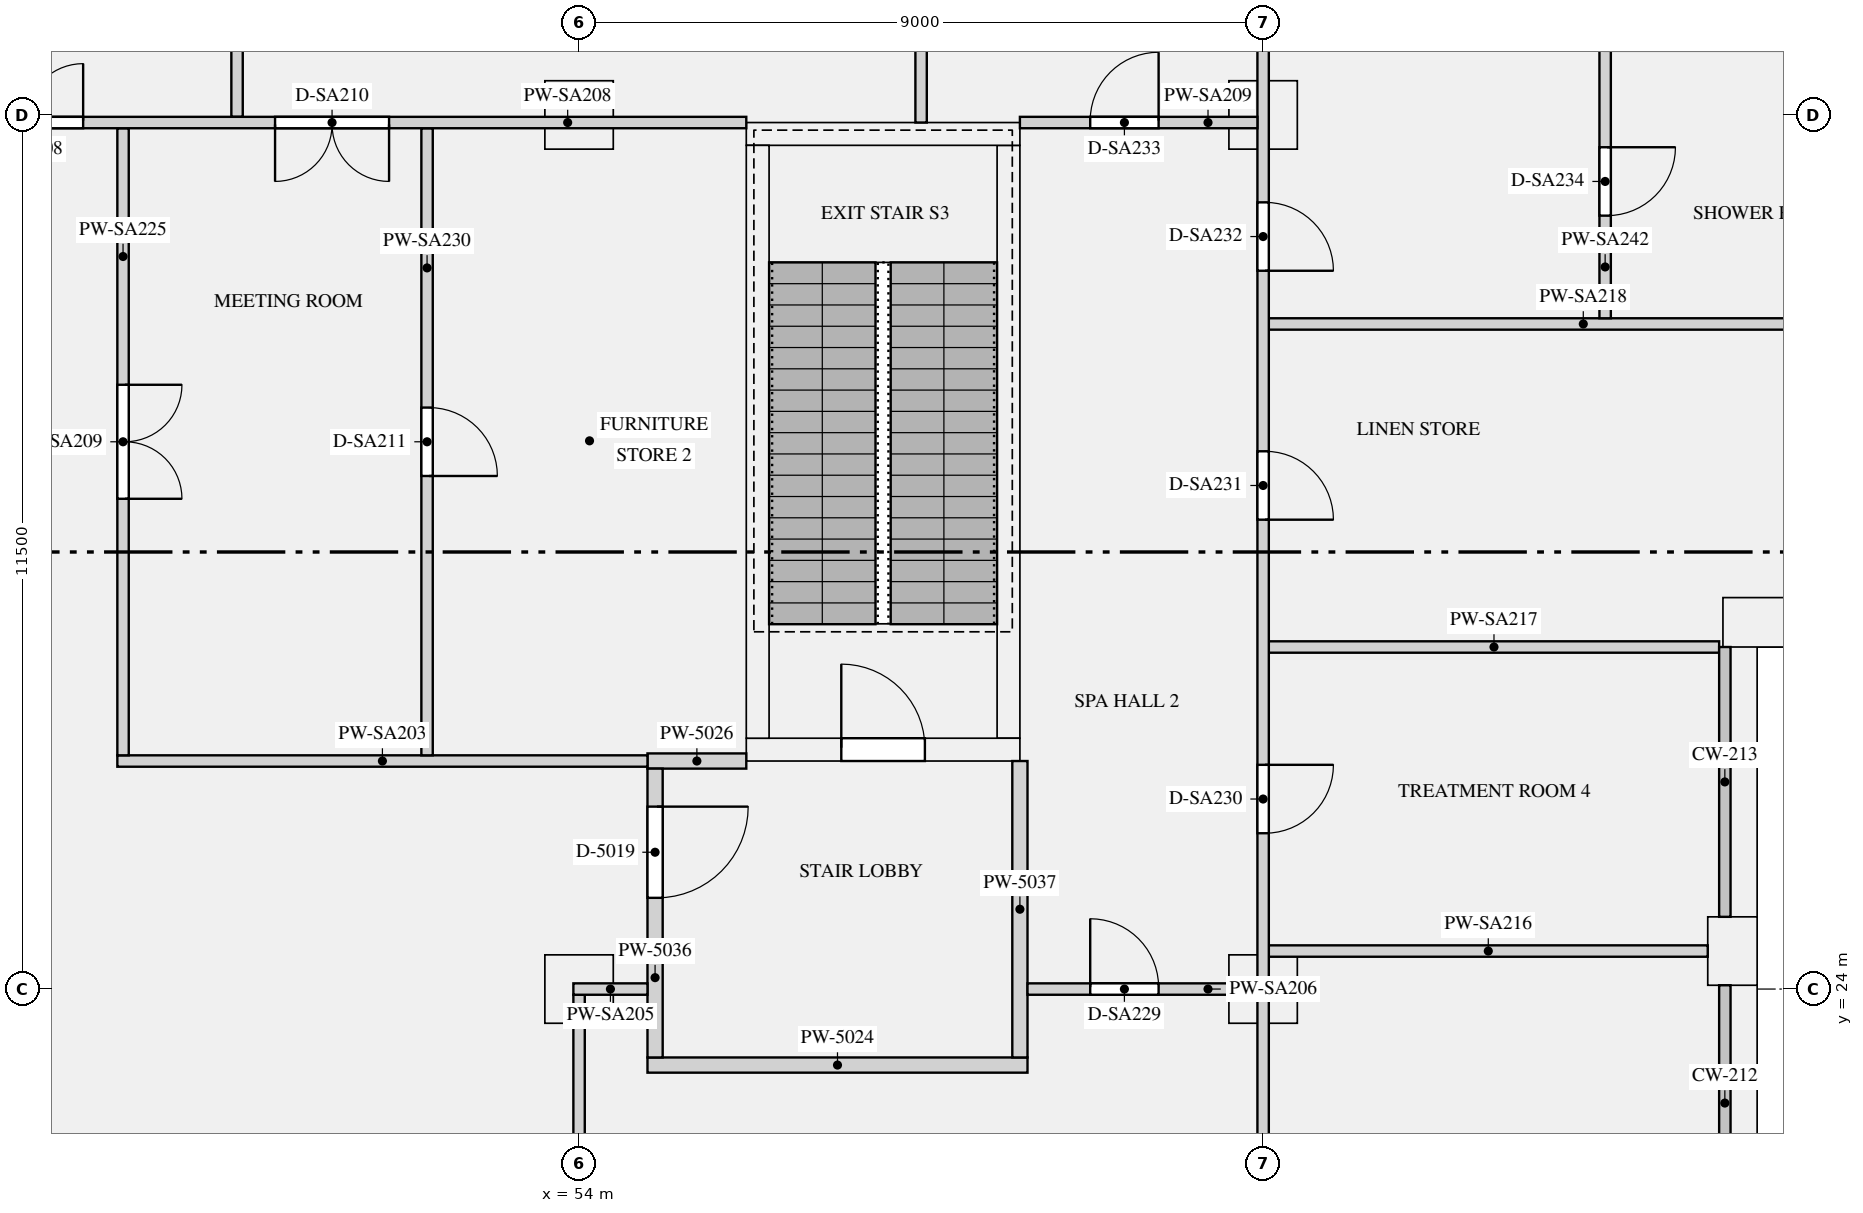
"""IFC4 building model, lengths in metres.
Left out: names, types, materials, properties, quantities, classifications, styles, units other than length and angle.
Written with IfcOpenShell. Run it as: python <this file> out.ifc"""

import sys

from ifc_helpers import new_model, si_unit, direction, frame, frame_2d, origin, origin_2d, place, context, subcontext, project, spatial, rectangle, extrude, element, fill, save


model = new_model("IFC4")
c1 = context("Model", 3, precision=1e-05, world=origin(), true_north=direction((0.0, 1.0)))
c2 = subcontext(c1, "Body", "Model", "MODEL_VIEW")
j1 = project(units=[si_unit("LENGTHUNIT", "METRE"), si_unit("PLANEANGLEUNIT", "RADIAN")], contexts=[c1])
p1 = place(None, origin())
s1 = spatial("IfcSite", under=j1, at=p1, CompositionType="ELEMENT")
p2 = place(p1, origin())
s2 = spatial("IfcBuilding", under=s1, at=p2, CompositionType="ELEMENT")
p3 = place(p2, frame((0.0, 0.0, 191.7)))
s3 = spatial("IfcBuildingStorey", under=s2, at=p3, CompositionType="ELEMENT", Elevation=191.7)
for number, where, z_axis, x_axis in (
    (1, (69.175, 24.5, 0.0), (0.0, 0.0, 1.0), (0.0, 1.0, 0.0)),
    (2, (69.5, 28.825, 0.0), (0.0, 0.0, 1.0), (1.0, 0.0, 0.0)),
):
    element("IfcColumn", number, at=place(p3, frame(where, z_axis=z_axis, x_axis=x_axis)), inside=s3, PredefinedType="USERDEFINED", context=c2, shape_type="SweptSolid", body=[
        extrude(rectangle(XDim=0.9, YDim=0.65, at=origin_2d()), origin(), (0.0, 0.0, 1.0), 6.3),
    ])
for number, where, z_axis, x_axis in (
    (3, (54.0, 24.0, 0.0), (0.0, 0.0, 1.0), (1.0, 0.0, 0.0)),
    (4, (63.0, 24.0, 0.0), (0.0, 0.0, 1.0), (1.0, 0.0, 0.0)),
    (5, (54.0, 35.5, 0.0), (0.0, 0.0, 1.0), (1.0, 0.0, 0.0)),
    (6, (63.0, 35.5, 0.0), (0.0, 0.0, 1.0), (1.0, 0.0, 0.0)),
):
    element("IfcColumn", number, at=place(p3, frame(where, z_axis=z_axis, x_axis=x_axis)), inside=s3, PredefinedType="COLUMN", context=c2, shape_type="SweptSolid", body=[
        extrude(rectangle(XDim=0.9, YDim=0.9, at=origin_2d()), origin(), (0.0, 0.0, 1.0), 6.3),
    ])
p4 = place(p3, frame((56.2, 27.15, 0.0), z_axis=(0.0, 0.0, 1.0), x_axis=(1.0, 0.0, 0.0)))
e7 = element("IfcWall", 7, at=p4, inside=s3, PredefinedType="SHEAR", context=c2, shape_type="SweptSolid", body=[
    extrude(rectangle(XDim=3.6, YDim=0.3, at=frame_2d((1.8, 0.0))), origin(), (0.0, 0.0, 1.0), 6.3),
])
p5 = place(p4, frame((1.25, 0.0, 0.0)))
e8 = element("IfcOpeningElement", 8, at=p5, cuts=e7, PredefinedType="OPENING", context=c2, shape_type="SweptSolid", body=[
    extrude(rectangle(XDim=1.1, YDim=2.1, at=frame_2d((0.55, 1.05))), frame((0.0, 0.16, 0.0), z_axis=(0.0, -1.0, 0.0), x_axis=(1.0, 0.0, 0.0)), (0.0, 0.0, 1.0), 0.32),
])
p6 = place(p3, frame((56.2, 35.25, 0.0), z_axis=(0.0, 0.0, 1.0), x_axis=(1.0, 0.0, 0.0)))
e9 = element("IfcWall", 9, at=p6, inside=s3, PredefinedType="SHEAR", context=c2, shape_type="SweptSolid", body=[
    extrude(rectangle(XDim=3.6, YDim=0.3, at=frame_2d((1.8, 0.0))), origin(), (0.0, 0.0, 1.0), 6.3),
])
for number, where, z_axis, x_axis in (
    (10, (56.35, 27.3, 0.0), (0.0, 0.0, 1.0), (0.0, 1.0, 0.0)),
    (11, (59.65, 27.3, 0.0), (0.0, 0.0, 1.0), (0.0, 1.0, 0.0)),
):
    element("IfcWall", number, at=place(p3, frame(where, z_axis=z_axis, x_axis=x_axis)), inside=s3, PredefinedType="SHEAR", context=c2, shape_type="SweptSolid", body=[
        extrude(rectangle(XDim=7.8, YDim=0.3, at=frame_2d((3.9, 0.0))), origin(), (0.0, 0.0, 1.0), 6.3),
    ])
p7 = place(p3, frame((54.9, 23.0, 0.0), z_axis=(0.0, 0.0, 1.0), x_axis=(1.0, 0.0, 0.0)))
e12 = element("IfcWall", 12, at=p7, inside=s3, PredefinedType="PARTITIONING", context=c2, shape_type="SweptSolid", body=[
    extrude(rectangle(XDim=5.0, YDim=0.2, at=frame_2d((2.5, 0.0))), origin(), (0.0, 0.0, 1.0), 5.98),
])
p8 = place(p3, frame((54.9, 27.0, 0.0), z_axis=(0.0, 0.0, 1.0), x_axis=(1.0, 0.0, 0.0)))
e13 = element("IfcWall", 13, at=p8, inside=s3, PredefinedType="PARTITIONING", context=c2, shape_type="SweptSolid", body=[
    extrude(rectangle(XDim=1.3, YDim=0.2, at=frame_2d((0.65, 0.0))), origin(), (0.0, 0.0, 1.0), 5.98),
])
p9 = place(p3, frame((55.0, 23.1, 0.0), z_axis=(0.0, 0.0, 1.0), x_axis=(0.0, 1.0, 0.0)))
e14 = element("IfcWall", 14, at=p9, inside=s3, PredefinedType="PARTITIONING", context=c2, shape_type="SweptSolid", body=[
    extrude(rectangle(XDim=3.8, YDim=0.2, at=frame_2d((1.9, 0.0))), origin(), (0.0, 0.0, 1.0), 5.98),
])
p10 = place(p9, frame((2.1, 0.0, 0.0)))
e15 = element("IfcOpeningElement", 15, at=p10, cuts=e14, PredefinedType="OPENING", context=c2, shape_type="SweptSolid", body=[
    extrude(rectangle(XDim=1.2, YDim=2.1, at=frame_2d((0.6, 1.05))), frame((0.0, 0.11, 0.0), z_axis=(0.0, -1.0, 0.0), x_axis=(1.0, 0.0, 0.0)), (0.0, 0.0, 1.0), 0.22),
])
p11 = place(p3, frame((59.8, 23.1, 0.0), z_axis=(0.0, 0.0, 1.0), x_axis=(0.0, 1.0, 0.0)))
e16 = element("IfcWall", 16, at=p11, inside=s3, PredefinedType="PARTITIONING", context=c2, shape_type="SweptSolid", body=[
    extrude(rectangle(XDim=3.9, YDim=0.2, at=frame_2d((1.95, 0.0))), origin(), (0.0, 0.0, 1.0), 5.98),
])
p12 = place(p3, frame((47.925, 27.0, 0.0), z_axis=(0.0, 0.0, 1.0), x_axis=(1.0, 0.0, 0.0)))
e17 = element("IfcWall", 17, at=p12, inside=s3, PredefinedType="PARTITIONING", context=c2, shape_type="SweptSolid", body=[
    extrude(rectangle(XDim=6.975, YDim=0.15, at=frame_2d((3.487, 0.0))), origin(), (0.0, 0.0, 1.0), 5.98),
])
p13 = place(p3, frame((53.925, 24.0, 0.0), z_axis=(0.0, 0.0, 1.0), x_axis=(1.0, 0.0, 0.0)))
e18 = element("IfcWall", 18, at=p13, inside=s3, PredefinedType="PARTITIONING", context=c2, shape_type="SweptSolid", body=[
    extrude(rectangle(XDim=0.975, YDim=0.15, at=frame_2d((0.487, 0.0))), origin(), (0.0, 0.0, 1.0), 5.98),
])
p14 = place(p3, frame((59.9, 24.0, 0.0), z_axis=(0.0, 0.0, 1.0), x_axis=(1.0, 0.0, 0.0)))
e19 = element("IfcWall", 19, at=p14, inside=s3, PredefinedType="PARTITIONING", context=c2, shape_type="SweptSolid", body=[
    extrude(rectangle(XDim=3.025, YDim=0.15, at=frame_2d((1.513, 0.0))), origin(), (0.0, 0.0, 1.0), 5.98),
])
p15 = place(p14, frame((0.825, 0.0, 0.0)))
e20 = element("IfcOpeningElement", 20, at=p15, cuts=e19, PredefinedType="OPENING", context=c2, shape_type="SweptSolid", body=[
    extrude(rectangle(XDim=0.9, YDim=2.1, at=frame_2d((0.45, 1.05))), frame((0.0, 0.085, 0.0), z_axis=(0.0, -1.0, 0.0), x_axis=(1.0, 0.0, 0.0)), (0.0, 0.0, 1.0), 0.17),
])
p16 = place(p3, frame((45.0, 35.4, 0.0), z_axis=(0.0, 0.0, 1.0), x_axis=(1.0, 0.0, 0.0)))
e21 = element("IfcWall", 21, at=p16, inside=s3, PredefinedType="PARTITIONING", context=c2, shape_type="SweptSolid", body=[
    extrude(rectangle(XDim=11.2, YDim=0.15, at=frame_2d((5.6, 0.0))), origin(), (0.0, 0.0, 1.0), 5.98),
])
p17 = place(p16, frame((0.975, 0.0, 0.0)))
e22 = element("IfcOpeningElement", 22, at=p17, cuts=e21, PredefinedType="OPENING", context=c2, shape_type="SweptSolid", body=[
    extrude(rectangle(XDim=1.5, YDim=2.1, at=frame_2d((0.75, 1.05))), frame((0.0, 0.085, 0.0), z_axis=(0.0, -1.0, 0.0), x_axis=(1.0, 0.0, 0.0)), (0.0, 0.0, 1.0), 0.17),
])
p18 = place(p16, frame((5.0, 0.0, 0.0)))
e23 = element("IfcOpeningElement", 23, at=p18, cuts=e21, PredefinedType="OPENING", context=c2, shape_type="SweptSolid", body=[
    extrude(rectangle(XDim=1.5, YDim=2.1, at=frame_2d((0.75, 1.05))), frame((0.0, 0.085, 0.0), z_axis=(0.0, -1.0, 0.0), x_axis=(1.0, 0.0, 0.0)), (0.0, 0.0, 1.0), 0.17),
])
p19 = place(p3, frame((59.8, 35.4, 0.0), z_axis=(0.0, 0.0, 1.0), x_axis=(1.0, 0.0, 0.0)))
e24 = element("IfcWall", 24, at=p19, inside=s3, PredefinedType="PARTITIONING", context=c2, shape_type="SweptSolid", body=[
    extrude(rectangle(XDim=3.125, YDim=0.15, at=frame_2d((1.562, 0.0))), origin(), (0.0, 0.0, 1.0), 5.98),
])
p20 = place(p19, frame((0.925, 0.0, 0.0)))
e25 = element("IfcOpeningElement", 25, at=p20, cuts=e24, PredefinedType="OPENING", context=c2, shape_type="SweptSolid", body=[
    extrude(rectangle(XDim=0.9, YDim=2.1, at=frame_2d((0.45, 1.05))), frame((0.0, 0.085, 0.0), z_axis=(0.0, -1.0, 0.0), x_axis=(1.0, 0.0, 0.0)), (0.0, 0.0, 1.0), 0.17),
])
p21 = place(p3, frame((63.075, 24.5, 0.0), z_axis=(0.0, 0.0, 1.0), x_axis=(1.0, 0.0, 0.0)))
e26 = element("IfcWall", 26, at=p21, inside=s3, PredefinedType="PARTITIONING", context=c2, shape_type="SweptSolid", body=[
    extrude(rectangle(XDim=5.775, YDim=0.15, at=frame_2d((2.888, 0.0))), origin(), (0.0, 0.0, 1.0), 5.98),
])
p22 = place(p3, frame((63.075, 28.5, 0.0), z_axis=(0.0, 0.0, 1.0), x_axis=(1.0, 0.0, 0.0)))
e27 = element("IfcWall", 27, at=p22, inside=s3, PredefinedType="PARTITIONING", context=c2, shape_type="SweptSolid", body=[
    extrude(rectangle(XDim=5.925, YDim=0.15, at=frame_2d((2.962, 0.0))), origin(), (0.0, 0.0, 1.0), 5.98),
])
p23 = place(p3, frame((63.075, 32.75, 0.0), z_axis=(0.0, 0.0, 1.0), x_axis=(1.0, 0.0, 0.0)))
e28 = element("IfcWall", 28, at=p23, inside=s3, PredefinedType="PARTITIONING", context=c2, shape_type="SweptSolid", body=[
    extrude(rectangle(XDim=8.275, YDim=0.15, at=frame_2d((4.138, 0.0))), origin(), (0.0, 0.0, 1.0), 5.98),
])
p24 = place(p3, frame((54.0, 16.1, 0.0), z_axis=(0.0, 0.0, 1.0), x_axis=(0.0, 1.0, 0.0)))
e29 = element("IfcWall", 29, at=p24, inside=s3, PredefinedType="PARTITIONING", context=c2, shape_type="SweptSolid", body=[
    extrude(rectangle(XDim=7.825, YDim=0.15, at=frame_2d((3.913, 0.0))), origin(), (0.0, 0.0, 1.0), 5.98),
])
p25 = place(p24, frame((1.65, 0.0, 0.0)))
e30 = element("IfcOpeningElement", 30, at=p25, cuts=e29, PredefinedType="OPENING", context=c2, shape_type="SweptSolid", body=[
    extrude(rectangle(XDim=1.5, YDim=2.1, at=frame_2d((0.75, 1.05))), frame((0.0, 0.085, 0.0), z_axis=(0.0, -1.0, 0.0), x_axis=(1.0, 0.0, 0.0)), (0.0, 0.0, 1.0), 0.17),
])
p26 = place(p3, frame((48.0, 27.075, 0.0), z_axis=(0.0, 0.0, 1.0), x_axis=(0.0, 1.0, 0.0)))
e31 = element("IfcWall", 31, at=p26, inside=s3, PredefinedType="PARTITIONING", context=c2, shape_type="SweptSolid", body=[
    extrude(rectangle(XDim=8.25, YDim=0.15, at=frame_2d((4.125, 0.0))), origin(), (0.0, 0.0, 1.0), 5.98),
])
p27 = place(p26, frame((3.375, 0.0, 0.0)))
e32 = element("IfcOpeningElement", 32, at=p27, cuts=e31, PredefinedType="OPENING", context=c2, shape_type="SweptSolid", body=[
    extrude(rectangle(XDim=1.5, YDim=2.1, at=frame_2d((0.75, 1.05))), frame((0.0, 0.085, 0.0), z_axis=(0.0, -1.0, 0.0), x_axis=(1.0, 0.0, 0.0)), (0.0, 0.0, 1.0), 0.17),
])
p28 = place(p3, frame((49.5, 35.475, 0.0), z_axis=(0.0, 0.0, 1.0), x_axis=(0.0, 1.0, 0.0)))
e33 = element("IfcWall", 33, at=p28, inside=s3, PredefinedType="PARTITIONING", context=c2, shape_type="SweptSolid", body=[
    extrude(rectangle(XDim=5.375, YDim=0.15, at=frame_2d((2.688, 0.0))), origin(), (0.0, 0.0, 1.0), 5.98),
])
p29 = place(p3, frame((52.0, 27.075, 0.0), z_axis=(0.0, 0.0, 1.0), x_axis=(0.0, 1.0, 0.0)))
e34 = element("IfcWall", 34, at=p29, inside=s3, PredefinedType="PARTITIONING", context=c2, shape_type="SweptSolid", body=[
    extrude(rectangle(XDim=8.25, YDim=0.15, at=frame_2d((4.125, 0.0))), origin(), (0.0, 0.0, 1.0), 5.98),
])
p30 = place(p29, frame((3.675, 0.0, 0.0)))
e35 = element("IfcOpeningElement", 35, at=p30, cuts=e34, PredefinedType="OPENING", context=c2, shape_type="SweptSolid", body=[
    extrude(rectangle(XDim=0.9, YDim=2.1, at=frame_2d((0.45, 1.05))), frame((0.0, 0.085, 0.0), z_axis=(0.0, -1.0, 0.0), x_axis=(1.0, 0.0, 0.0)), (0.0, 0.0, 1.0), 0.17),
])
p31 = place(p3, frame((58.5, 35.4, 0.0), z_axis=(0.0, 0.0, 1.0), x_axis=(0.0, 1.0, 0.0)))
e36 = element("IfcWall", 36, at=p31, inside=s3, PredefinedType="PARTITIONING", context=c2, shape_type="SweptSolid", body=[
    extrude(rectangle(XDim=5.45, YDim=0.15, at=frame_2d((2.725, 0.0))), origin(), (0.0, 0.0, 1.0), 5.98),
])
p32 = place(p3, frame((63.0, 16.575, 0.0), z_axis=(0.0, 0.0, 1.0), x_axis=(0.0, 1.0, 0.0)))
e37 = element("IfcWall", 37, at=p32, inside=s3, PredefinedType="PARTITIONING", context=c2, shape_type="SweptSolid", body=[
    extrude(rectangle(XDim=24.275, YDim=0.15, at=frame_2d((12.138, 0.0))), origin(), (0.0, 0.0, 1.0), 5.98),
])
p33 = place(p32, frame((2.7, 0.0, 0.0)))
e38 = element("IfcOpeningElement", 38, at=p33, cuts=e37, PredefinedType="OPENING", context=c2, shape_type="SweptSolid", body=[
    extrude(rectangle(XDim=1.5, YDim=2.1, at=frame_2d((0.75, 1.05))), frame((0.0, 0.085, 0.0), z_axis=(0.0, -1.0, 0.0), x_axis=(1.0, 0.0, 0.0)), (0.0, 0.0, 1.0), 0.17),
])
p34 = place(p32, frame((9.475, 0.0, 0.0)))
e39 = element("IfcOpeningElement", 39, at=p34, cuts=e37, PredefinedType="OPENING", context=c2, shape_type="SweptSolid", body=[
    extrude(rectangle(XDim=0.9, YDim=2.1, at=frame_2d((0.45, 1.05))), frame((0.0, 0.085, 0.0), z_axis=(0.0, -1.0, 0.0), x_axis=(1.0, 0.0, 0.0)), (0.0, 0.0, 1.0), 0.17),
])
p35 = place(p32, frame((13.6, 0.0, 0.0)))
e40 = element("IfcOpeningElement", 40, at=p35, cuts=e37, PredefinedType="OPENING", context=c2, shape_type="SweptSolid", body=[
    extrude(rectangle(XDim=0.9, YDim=2.1, at=frame_2d((0.45, 1.05))), frame((0.0, 0.085, 0.0), z_axis=(0.0, -1.0, 0.0), x_axis=(1.0, 0.0, 0.0)), (0.0, 0.0, 1.0), 0.17),
])
p36 = place(p32, frame((16.875, 0.0, 0.0)))
e41 = element("IfcOpeningElement", 41, at=p36, cuts=e37, PredefinedType="OPENING", context=c2, shape_type="SweptSolid", body=[
    extrude(rectangle(XDim=0.9, YDim=2.1, at=frame_2d((0.45, 1.05))), frame((0.0, 0.085, 0.0), z_axis=(0.0, -1.0, 0.0), x_axis=(1.0, 0.0, 0.0)), (0.0, 0.0, 1.0), 0.17),
])
p37 = place(p3, frame((67.5, 32.825, 0.0), z_axis=(0.0, 0.0, 1.0), x_axis=(0.0, 1.0, 0.0)))
e42 = element("IfcWall", 42, at=p37, inside=s3, PredefinedType="PARTITIONING", context=c2, shape_type="SweptSolid", body=[
    extrude(rectangle(XDim=3.525, YDim=0.15, at=frame_2d((1.763, 0.0))), origin(), (0.0, 0.0, 1.0), 5.98),
])
p38 = place(p37, frame((1.35, 0.0, 0.0)))
e43 = element("IfcOpeningElement", 43, at=p38, cuts=e42, PredefinedType="OPENING", context=c2, shape_type="SweptSolid", body=[
    extrude(rectangle(XDim=0.9, YDim=2.1, at=frame_2d((0.45, 1.05))), frame((0.0, 0.085, 0.0), z_axis=(0.0, -1.0, 0.0), x_axis=(1.0, 0.0, 0.0)), (0.0, 0.0, 1.0), 0.17),
])
p39 = place(p5, origin())
e44 = element("IfcDoor", 44, at=p39, inside=s3, OperationType="SINGLE_SWING_LEFT", PredefinedType="DOOR", context=c2, shape_type="SweptSolid", body=[
    extrude(rectangle(XDim=1.1, YDim=2.1, at=frame_2d((0.55, 1.05))), frame((0.0, 0.025, 0.0), z_axis=(0.0, -1.0, 0.0), x_axis=(1.0, 0.0, 0.0)), (0.0, 0.0, 1.0), 0.05),
])
fill(e8, e44)
p40 = place(p10, frame((1.2, 0.0, 0.0), z_axis=(0.0, 0.0, 1.0), x_axis=(-1.0, 0.0, 0.0)))
e45 = element("IfcDoor", 45, at=p40, inside=s3, OperationType="SINGLE_SWING_LEFT", PredefinedType="DOOR", context=c2, shape_type="SweptSolid", body=[
    extrude(rectangle(XDim=1.2, YDim=2.1, at=frame_2d((0.6, 1.05))), frame((0.0, 0.025, 0.0), z_axis=(0.0, -1.0, 0.0), x_axis=(1.0, 0.0, 0.0)), (0.0, 0.0, 1.0), 0.05),
])
fill(e15, e45)
p41 = place(p17, origin())
e46 = element("IfcDoor", 46, at=p41, inside=s3, OperationType="DOUBLE_DOOR_SINGLE_SWING", PredefinedType="DOOR", context=c2, shape_type="SweptSolid", body=[
    extrude(rectangle(XDim=1.5, YDim=2.1, at=frame_2d((0.75, 1.05))), frame((0.0, 0.025, 0.0), z_axis=(0.0, -1.0, 0.0), x_axis=(1.0, 0.0, 0.0)), (0.0, 0.0, 1.0), 0.05),
])
fill(e22, e46)
p42 = place(p27, frame((1.5, 0.0, 0.0), z_axis=(0.0, 0.0, 1.0), x_axis=(-1.0, 0.0, 0.0)))
e47 = element("IfcDoor", 47, at=p42, inside=s3, OperationType="DOUBLE_DOOR_SINGLE_SWING", PredefinedType="DOOR", context=c2, shape_type="SweptSolid", body=[
    extrude(rectangle(XDim=1.5, YDim=2.1, at=frame_2d((0.75, 1.05))), frame((0.0, 0.025, 0.0), z_axis=(0.0, -1.0, 0.0), x_axis=(1.0, 0.0, 0.0)), (0.0, 0.0, 1.0), 0.05),
])
fill(e32, e47)
p43 = place(p18, frame((1.5, 0.0, 0.0), z_axis=(0.0, 0.0, 1.0), x_axis=(-1.0, 0.0, 0.0)))
e48 = element("IfcDoor", 48, at=p43, inside=s3, OperationType="DOUBLE_DOOR_SINGLE_SWING", PredefinedType="DOOR", context=c2, shape_type="SweptSolid", body=[
    extrude(rectangle(XDim=1.5, YDim=2.1, at=frame_2d((0.75, 1.05))), frame((0.0, 0.025, 0.0), z_axis=(0.0, -1.0, 0.0), x_axis=(1.0, 0.0, 0.0)), (0.0, 0.0, 1.0), 0.05),
])
fill(e23, e48)
p44 = place(p30, frame((0.9, 0.0, 0.0), z_axis=(0.0, 0.0, 1.0), x_axis=(-1.0, 0.0, 0.0)))
e49 = element("IfcDoor", 49, at=p44, inside=s3, OperationType="SINGLE_SWING_RIGHT", PredefinedType="DOOR", context=c2, shape_type="SweptSolid", body=[
    extrude(rectangle(XDim=0.9, YDim=2.1, at=frame_2d((0.45, 1.05))), frame((0.0, 0.025, 0.0), z_axis=(0.0, -1.0, 0.0), x_axis=(1.0, 0.0, 0.0)), (0.0, 0.0, 1.0), 0.05),
])
fill(e35, e49)
p45 = place(p15, origin())
e50 = element("IfcDoor", 50, at=p45, inside=s3, OperationType="SINGLE_SWING_LEFT", PredefinedType="DOOR", context=c2, shape_type="SweptSolid", body=[
    extrude(rectangle(XDim=0.9, YDim=2.1, at=frame_2d((0.45, 1.05))), frame((0.0, 0.025, 0.0), z_axis=(0.0, -1.0, 0.0), x_axis=(1.0, 0.0, 0.0)), (0.0, 0.0, 1.0), 0.05),
])
fill(e20, e50)
p46 = place(p34, frame((0.9, 0.0, 0.0), z_axis=(0.0, 0.0, 1.0), x_axis=(-1.0, 0.0, 0.0)))
e51 = element("IfcDoor", 51, at=p46, inside=s3, OperationType="SINGLE_SWING_LEFT", PredefinedType="DOOR", context=c2, shape_type="SweptSolid", body=[
    extrude(rectangle(XDim=0.9, YDim=2.1, at=frame_2d((0.45, 1.05))), frame((0.0, 0.025, 0.0), z_axis=(0.0, -1.0, 0.0), x_axis=(1.0, 0.0, 0.0)), (0.0, 0.0, 1.0), 0.05),
])
fill(e39, e51)
p47 = place(p35, frame((0.9, 0.0, 0.0), z_axis=(0.0, 0.0, 1.0), x_axis=(-1.0, 0.0, 0.0)))
e52 = element("IfcDoor", 52, at=p47, inside=s3, OperationType="SINGLE_SWING_RIGHT", PredefinedType="DOOR", context=c2, shape_type="SweptSolid", body=[
    extrude(rectangle(XDim=0.9, YDim=2.1, at=frame_2d((0.45, 1.05))), frame((0.0, 0.025, 0.0), z_axis=(0.0, -1.0, 0.0), x_axis=(1.0, 0.0, 0.0)), (0.0, 0.0, 1.0), 0.05),
])
fill(e40, e52)
p48 = place(p36, frame((0.9, 0.0, 0.0), z_axis=(0.0, 0.0, 1.0), x_axis=(-1.0, 0.0, 0.0)))
e53 = element("IfcDoor", 53, at=p48, inside=s3, OperationType="SINGLE_SWING_RIGHT", PredefinedType="DOOR", context=c2, shape_type="SweptSolid", body=[
    extrude(rectangle(XDim=0.9, YDim=2.1, at=frame_2d((0.45, 1.05))), frame((0.0, 0.025, 0.0), z_axis=(0.0, -1.0, 0.0), x_axis=(1.0, 0.0, 0.0)), (0.0, 0.0, 1.0), 0.05),
])
fill(e41, e53)
p49 = place(p20, origin())
e54 = element("IfcDoor", 54, at=p49, inside=s3, OperationType="SINGLE_SWING_RIGHT", PredefinedType="DOOR", context=c2, shape_type="SweptSolid", body=[
    extrude(rectangle(XDim=0.9, YDim=2.1, at=frame_2d((0.45, 1.05))), frame((0.0, 0.025, 0.0), z_axis=(0.0, -1.0, 0.0), x_axis=(1.0, 0.0, 0.0)), (0.0, 0.0, 1.0), 0.05),
])
fill(e25, e54)
p50 = place(p38, frame((0.9, 0.0, 0.0), z_axis=(0.0, 0.0, 1.0), x_axis=(-1.0, 0.0, 0.0)))
e55 = element("IfcDoor", 55, at=p50, inside=s3, OperationType="SINGLE_SWING_LEFT", PredefinedType="DOOR", context=c2, shape_type="SweptSolid", body=[
    extrude(rectangle(XDim=0.9, YDim=2.1, at=frame_2d((0.45, 1.05))), frame((0.0, 0.025, 0.0), z_axis=(0.0, -1.0, 0.0), x_axis=(1.0, 0.0, 0.0)), (0.0, 0.0, 1.0), 0.05),
])
fill(e43, e55)
save(model, sys.argv[1])
